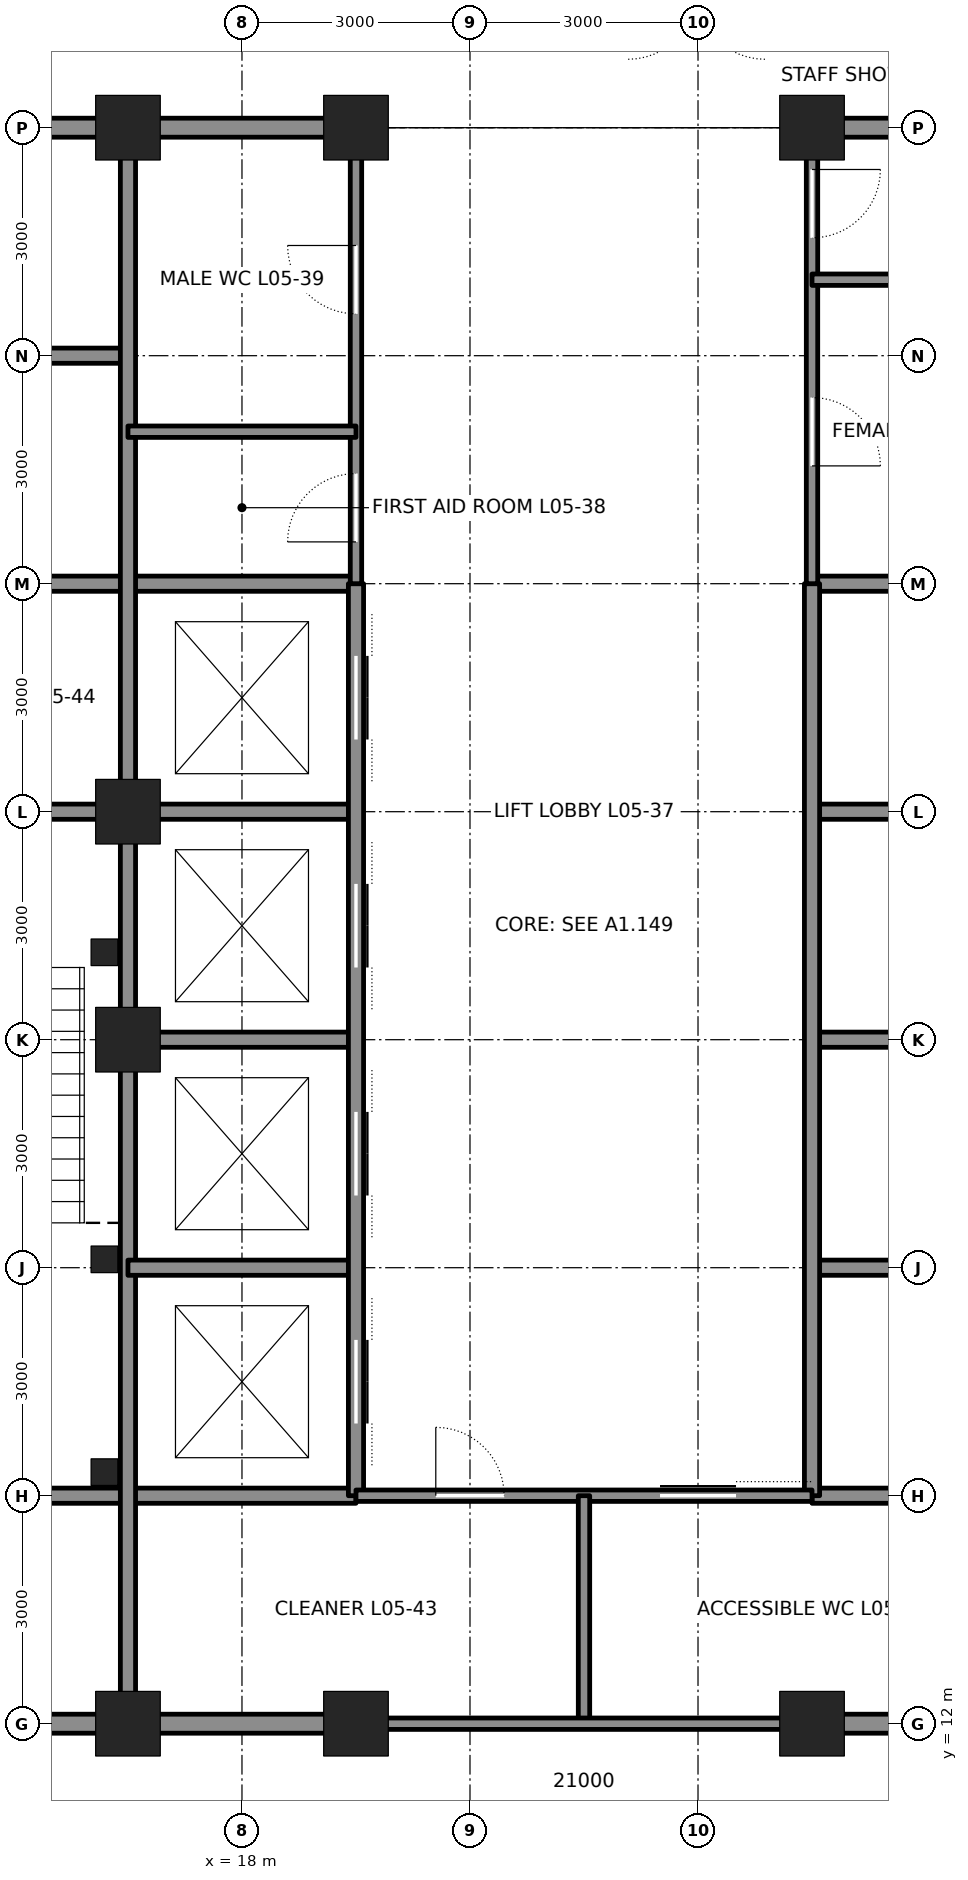
"""IFC4 building model, lengths in metres.
Left out: names, types, materials, properties, quantities, classifications, styles, units other than length and angle.
Written with IfcOpenShell. Run it as: python <this file> out.ifc"""

import sys

from ifc_helpers import new_model, si_unit, direction, frame, frame_2d, origin, origin_2d, place, context, subcontext, project, spatial, rectangle, hollow_rectangle, extrude, element, fill, save


model = new_model("IFC4")
c1 = context("Model", 3, precision=1e-05, world=origin(), true_north=direction((0.0, 1.0)))
c2 = subcontext(c1, "Body", "Model", "MODEL_VIEW")
j1 = project(units=[si_unit("LENGTHUNIT", "METRE"), si_unit("PLANEANGLEUNIT", "RADIAN")], contexts=[c1])
p1 = place(None, origin())
s1 = spatial("IfcSite", under=j1, at=p1, CompositionType="ELEMENT")
p2 = place(p1, origin())
s2 = spatial("IfcBuilding", under=s1, at=p2, CompositionType="ELEMENT")
p3 = place(p2, frame((0.0, 0.0, 28.8)))
s3 = spatial("IfcBuildingStorey", under=s2, at=p3, CompositionType="ELEMENT", Elevation=28.8)
for number, where, z_axis, x_axis in (
    (1, (16.5, 12.0, 0.0), (0.0, 0.0, 1.0), (1.0, 0.0, 0.0)),
    (2, (19.5, 12.0, 0.0), (0.0, 0.0, 1.0), (1.0, 0.0, 0.0)),
    (3, (25.5, 12.0, 0.0), (0.0, 0.0, 1.0), (1.0, 0.0, 0.0)),
    (4, (16.5, 33.0, 0.0), (0.0, 0.0, 1.0), (1.0, 0.0, 0.0)),
    (5, (19.5, 33.0, 0.0), (0.0, 0.0, 1.0), (1.0, 0.0, 0.0)),
    (6, (25.5, 33.0, 0.0), (0.0, 0.0, 1.0), (1.0, 0.0, 0.0)),
    (7, (16.5, 21.0, 0.0), (0.0, 0.0, 1.0), (1.0, 0.0, 0.0)),
    (8, (16.5, 24.0, 0.0), (0.0, 0.0, 1.0), (1.0, 0.0, 0.0)),
):
    element("IfcColumn", number, at=place(p3, frame(where, z_axis=z_axis, x_axis=x_axis)), inside=s3, PredefinedType="COLUMN", context=c2, shape_type="SweptSolid", body=[
        extrude(hollow_rectangle(XDim=0.85, YDim=0.85, WallThickness=0.085, at=origin_2d()), origin(), (0.0, 0.0, 1.0), 4.5),
    ])
p4 = place(p3, frame((12.25, 12.0, 0.0), z_axis=(0.0, 0.0, 1.0), x_axis=(1.0, 0.0, 0.0)))
e9 = element("IfcWall", 9, at=p4, inside=s3, PredefinedType="SOLIDWALL", context=c2, shape_type="SweptSolid", body=[
    extrude(rectangle(XDim=4.0, YDim=0.25, at=frame_2d((2.0, 0.0))), origin(), (0.0, 0.0, 1.0), 3.181),
])
for number, where, z_axis, x_axis in (
    (10, (16.75, 12.0, 0.0), (0.0, 0.0, 1.0), (1.0, 0.0, 0.0)),
    (11, (25.75, 12.0, 0.0), (0.0, 0.0, 1.0), (1.0, 0.0, 0.0)),
):
    element("IfcWall", number, at=place(p3, frame(where, z_axis=z_axis, x_axis=x_axis)), inside=s3, PredefinedType="SOLIDWALL", context=c2, shape_type="SweptSolid", body=[
        extrude(rectangle(XDim=2.5, YDim=0.25, at=frame_2d((1.25, 0.0))), origin(), (0.0, 0.0, 1.0), 3.181),
    ])
for number, where, z_axis, x_axis in (
    (12, (12.0, 15.0, 0.0), (0.0, 0.0, 1.0), (1.0, 0.0, 0.0)),
    (13, (25.5, 15.0, 0.0), (0.0, 0.0, 1.0), (1.0, 0.0, 0.0)),
):
    element("IfcWall", number, at=place(p3, frame(where, z_axis=z_axis, x_axis=x_axis)), inside=s3, PredefinedType="SOLIDWALL", context=c2, shape_type="SweptSolid", body=[
        extrude(rectangle(XDim=7.5, YDim=0.2, at=frame_2d((3.75, 0.0))), origin(), (0.0, 0.0, 1.0), 4.34),
    ])
p5 = place(p3, frame((12.25, 24.0, 0.0), z_axis=(0.0, 0.0, 1.0), x_axis=(1.0, 0.0, 0.0)))
e14 = element("IfcWall", 14, at=p5, inside=s3, PredefinedType="SOLIDWALL", context=c2, shape_type="SweptSolid", body=[
    extrude(rectangle(XDim=4.0, YDim=0.2, at=frame_2d((2.0, 0.0))), origin(), (0.0, 0.0, 1.0), 3.39),
])
p6 = place(p5, frame((1.4, 0.0, 0.0)))
e15 = element("IfcOpeningElement", 15, at=p6, cuts=e14, PredefinedType="OPENING", context=c2, shape_type="SweptSolid", body=[
    extrude(rectangle(XDim=1.2, YDim=2.1, at=frame_2d((0.6, 1.05))), frame((0.0, 0.11, 0.0), z_axis=(0.0, -1.0, 0.0), x_axis=(1.0, 0.0, 0.0)), (0.0, 0.0, 1.0), 0.22),
])
for number, where, z_axis, x_axis in (
    (16, (16.75, 24.0, 0.0), (0.0, 0.0, 1.0), (1.0, 0.0, 0.0)),
    (17, (25.5, 24.0, 0.0), (0.0, 0.0, 1.0), (1.0, 0.0, 0.0)),
):
    element("IfcWall", number, at=place(p3, frame(where, z_axis=z_axis, x_axis=x_axis)), inside=s3, PredefinedType="SOLIDWALL", context=c2, shape_type="SweptSolid", body=[
        extrude(rectangle(XDim=2.75, YDim=0.2, at=frame_2d((1.375, 0.0))), origin(), (0.0, 0.0, 1.0), 3.39),
    ])
p7 = place(p3, frame((12.0, 27.0, 0.0), z_axis=(0.0, 0.0, 1.0), x_axis=(1.0, 0.0, 0.0)))
e18 = element("IfcWall", 18, at=p7, inside=s3, PredefinedType="SOLIDWALL", context=c2, shape_type="SweptSolid", body=[
    extrude(rectangle(XDim=7.5, YDim=0.2, at=frame_2d((3.75, 0.0))), origin(), (0.0, 0.0, 1.0), 4.34),
])
p8 = place(p7, frame((1.65, 0.0, 0.0)))
e19 = element("IfcOpeningElement", 19, at=p8, cuts=e18, PredefinedType="OPENING", context=c2, shape_type="SweptSolid", body=[
    extrude(rectangle(XDim=1.2, YDim=2.1, at=frame_2d((0.6, 1.05))), frame((0.0, 0.11, 0.0), z_axis=(0.0, -1.0, 0.0), x_axis=(1.0, 0.0, 0.0)), (0.0, 0.0, 1.0), 0.22),
])
p9 = place(p3, frame((25.5, 27.0, 0.0), z_axis=(0.0, 0.0, 1.0), x_axis=(1.0, 0.0, 0.0)))
e20 = element("IfcWall", 20, at=p9, inside=s3, PredefinedType="SOLIDWALL", context=c2, shape_type="SweptSolid", body=[
    extrude(rectangle(XDim=3.0, YDim=0.2, at=frame_2d((1.5, 0.0))), origin(), (0.0, 0.0, 1.0), 4.34),
])
p10 = place(p3, frame((12.0, 30.0, 0.0), z_axis=(0.0, 0.0, 1.0), x_axis=(1.0, 0.0, 0.0)))
e21 = element("IfcWall", 21, at=p10, inside=s3, PredefinedType="SOLIDWALL", context=c2, shape_type="SweptSolid", body=[
    extrude(rectangle(XDim=4.5, YDim=0.2, at=frame_2d((2.25, 0.0))), origin(), (0.0, 0.0, 1.0), 4.34),
])
p11 = place(p3, frame((12.25, 33.0, 0.0), z_axis=(0.0, 0.0, 1.0), x_axis=(1.0, 0.0, 0.0)))
e22 = element("IfcWall", 22, at=p11, inside=s3, PredefinedType="SOLIDWALL", context=c2, shape_type="SweptSolid", body=[
    extrude(rectangle(XDim=4.0, YDim=0.25, at=frame_2d((2.0, 0.0))), origin(), (0.0, 0.0, 1.0), 3.181),
])
for number, where, z_axis, x_axis in (
    (23, (16.75, 33.0, 0.0), (0.0, 0.0, 1.0), (1.0, 0.0, 0.0)),
    (24, (25.75, 33.0, 0.0), (0.0, 0.0, 1.0), (1.0, 0.0, 0.0)),
):
    element("IfcWall", number, at=place(p3, frame(where, z_axis=z_axis, x_axis=x_axis)), inside=s3, PredefinedType="SOLIDWALL", context=c2, shape_type="SweptSolid", body=[
        extrude(rectangle(XDim=2.5, YDim=0.25, at=frame_2d((1.25, 0.0))), origin(), (0.0, 0.0, 1.0), 3.181),
    ])
p12 = place(p3, frame((16.5, 12.25, 0.0), z_axis=(0.0, 0.0, 1.0), x_axis=(0.0, 1.0, 0.0)))
e25 = element("IfcWall", 25, at=p12, inside=s3, PredefinedType="SOLIDWALL", context=c2, shape_type="SweptSolid", body=[
    extrude(rectangle(XDim=8.5, YDim=0.2, at=frame_2d((4.25, 0.0))), origin(), (0.0, 0.0, 1.0), 3.413),
])
p13 = place(p3, frame((16.5, 21.25, 0.0), z_axis=(0.0, 0.0, 1.0), x_axis=(0.0, 1.0, 0.0)))
e26 = element("IfcWall", 26, at=p13, inside=s3, PredefinedType="SOLIDWALL", context=c2, shape_type="SweptSolid", body=[
    extrude(rectangle(XDim=2.5, YDim=0.2, at=frame_2d((1.25, 0.0))), origin(), (0.0, 0.0, 1.0), 3.413),
])
p14 = place(p3, frame((16.5, 24.25, 0.0), z_axis=(0.0, 0.0, 1.0), x_axis=(0.0, 1.0, 0.0)))
e27 = element("IfcWall", 27, at=p14, inside=s3, PredefinedType="SOLIDWALL", context=c2, shape_type="SweptSolid", body=[
    extrude(rectangle(XDim=8.5, YDim=0.2, at=frame_2d((4.25, 0.0))), origin(), (0.0, 0.0, 1.0), 3.413),
])
p15 = place(p3, frame((16.5, 18.0, 0.0), z_axis=(0.0, 0.0, 1.0), x_axis=(1.0, 0.0, 0.0)))
e28 = element("IfcWall", 28, at=p15, inside=s3, PredefinedType="SOLIDWALL", context=c2, shape_type="SweptSolid", body=[
    extrude(rectangle(XDim=3.0, YDim=0.2, at=frame_2d((1.5, 0.0))), origin(), (0.0, 0.0, 1.0), 4.34),
])
p16 = place(p3, frame((25.5, 18.0, 0.0), z_axis=(0.0, 0.0, 1.0), x_axis=(1.0, 0.0, 0.0)))
e29 = element("IfcWall", 29, at=p16, inside=s3, PredefinedType="SOLIDWALL", context=c2, shape_type="SweptSolid", body=[
    extrude(rectangle(XDim=7.5, YDim=0.2, at=frame_2d((3.75, 0.0))), origin(), (0.0, 0.0, 1.0), 4.34),
])
p17 = place(p16, frame((4.65, 0.0, 0.0)))
e30 = element("IfcOpeningElement", 30, at=p17, cuts=e29, PredefinedType="OPENING", context=c2, shape_type="SweptSolid", body=[
    extrude(rectangle(XDim=1.2, YDim=2.1, at=frame_2d((0.6, 1.05))), frame((0.0, 0.11, 0.0), z_axis=(0.0, -1.0, 0.0), x_axis=(1.0, 0.0, 0.0)), (0.0, 0.0, 1.0), 0.22),
])
for number, where, z_axis, x_axis in (
    (31, (16.75, 21.0, 0.0), (0.0, 0.0, 1.0), (1.0, 0.0, 0.0)),
    (32, (25.5, 21.0, 0.0), (0.0, 0.0, 1.0), (1.0, 0.0, 0.0)),
):
    element("IfcWall", number, at=place(p3, frame(where, z_axis=z_axis, x_axis=x_axis)), inside=s3, PredefinedType="SOLIDWALL", context=c2, shape_type="SweptSolid", body=[
        extrude(rectangle(XDim=2.75, YDim=0.2, at=frame_2d((1.375, 0.0))), origin(), (0.0, 0.0, 1.0), 3.39),
    ])
p18 = place(p3, frame((19.5, 15.0, 0.0), z_axis=(0.0, 0.0, 1.0), x_axis=(0.0, 1.0, 0.0)))
e33 = element("IfcWall", 33, at=p18, inside=s3, PredefinedType="SOLIDWALL", context=c2, shape_type="SweptSolid", body=[
    extrude(rectangle(XDim=12.0, YDim=0.2, at=frame_2d((6.0, 0.0))), origin(), (0.0, 0.0, 1.0), 3.365),
])
p19 = place(p18, frame((0.95, 0.0, 0.0)))
e34 = element("IfcOpeningElement", 34, at=p19, cuts=e33, PredefinedType="OPENING", context=c2, shape_type="SweptSolid", body=[
    extrude(rectangle(XDim=1.1, YDim=2.1, at=frame_2d((0.55, 1.05))), frame((0.0, 0.11, 0.0), z_axis=(0.0, -1.0, 0.0), x_axis=(1.0, 0.0, 0.0)), (0.0, 0.0, 1.0), 0.22),
])
p20 = place(p18, frame((3.95, 0.0, 0.0)))
e35 = element("IfcOpeningElement", 35, at=p20, cuts=e33, PredefinedType="OPENING", context=c2, shape_type="SweptSolid", body=[
    extrude(rectangle(XDim=1.1, YDim=2.1, at=frame_2d((0.55, 1.05))), frame((0.0, 0.11, 0.0), z_axis=(0.0, -1.0, 0.0), x_axis=(1.0, 0.0, 0.0)), (0.0, 0.0, 1.0), 0.22),
])
p21 = place(p18, frame((6.95, 0.0, 0.0)))
e36 = element("IfcOpeningElement", 36, at=p21, cuts=e33, PredefinedType="OPENING", context=c2, shape_type="SweptSolid", body=[
    extrude(rectangle(XDim=1.1, YDim=2.1, at=frame_2d((0.55, 1.05))), frame((0.0, 0.11, 0.0), z_axis=(0.0, -1.0, 0.0), x_axis=(1.0, 0.0, 0.0)), (0.0, 0.0, 1.0), 0.22),
])
p22 = place(p18, frame((9.95, 0.0, 0.0)))
e37 = element("IfcOpeningElement", 37, at=p22, cuts=e33, PredefinedType="OPENING", context=c2, shape_type="SweptSolid", body=[
    extrude(rectangle(XDim=1.1, YDim=2.1, at=frame_2d((0.55, 1.05))), frame((0.0, 0.11, 0.0), z_axis=(0.0, -1.0, 0.0), x_axis=(1.0, 0.0, 0.0)), (0.0, 0.0, 1.0), 0.22),
])
p23 = place(p3, frame((19.5, 27.0, 0.0), z_axis=(0.0, 0.0, 1.0), x_axis=(0.0, 1.0, 0.0)))
e38 = element("IfcWall", 38, at=p23, inside=s3, PredefinedType="PARTITIONING", context=c2, shape_type="SweptSolid", body=[
    extrude(rectangle(XDim=5.75, YDim=0.15, at=frame_2d((2.875, 0.0))), origin(), (0.0, 0.0, 1.0), 3.365),
])
p24 = place(p23, frame((0.55, 0.0, 0.0)))
e39 = element("IfcOpeningElement", 39, at=p24, cuts=e38, PredefinedType="OPENING", context=c2, shape_type="SweptSolid", body=[
    extrude(rectangle(XDim=0.9, YDim=2.1, at=frame_2d((0.45, 1.05))), frame((0.0, 0.085, 0.0), z_axis=(0.0, -1.0, 0.0), x_axis=(1.0, 0.0, 0.0)), (0.0, 0.0, 1.0), 0.17),
])
p25 = place(p23, frame((3.55, 0.0, 0.0)))
e40 = element("IfcOpeningElement", 40, at=p25, cuts=e38, PredefinedType="OPENING", context=c2, shape_type="SweptSolid", body=[
    extrude(rectangle(XDim=0.9, YDim=2.1, at=frame_2d((0.45, 1.05))), frame((0.0, 0.085, 0.0), z_axis=(0.0, -1.0, 0.0), x_axis=(1.0, 0.0, 0.0)), (0.0, 0.0, 1.0), 0.17),
])
p26 = place(p3, frame((25.5, 15.0, 0.0), z_axis=(0.0, 0.0, 1.0), x_axis=(0.0, 1.0, 0.0)))
e41 = element("IfcWall", 41, at=p26, inside=s3, PredefinedType="SOLIDWALL", context=c2, shape_type="SweptSolid", body=[
    extrude(rectangle(XDim=12.0, YDim=0.2, at=frame_2d((6.0, 0.0))), origin(), (0.0, 0.0, 1.0), 3.365),
])
p27 = place(p3, frame((25.5, 27.0, 0.0), z_axis=(0.0, 0.0, 1.0), x_axis=(0.0, 1.0, 0.0)))
e42 = element("IfcWall", 42, at=p27, inside=s3, PredefinedType="PARTITIONING", context=c2, shape_type="SweptSolid", body=[
    extrude(rectangle(XDim=5.75, YDim=0.15, at=frame_2d((2.875, 0.0))), origin(), (0.0, 0.0, 1.0), 3.365),
])
p28 = place(p27, frame((1.55, 0.0, 0.0)))
e43 = element("IfcOpeningElement", 43, at=p28, cuts=e42, PredefinedType="OPENING", context=c2, shape_type="SweptSolid", body=[
    extrude(rectangle(XDim=0.9, YDim=2.1, at=frame_2d((0.45, 1.05))), frame((0.0, 0.085, 0.0), z_axis=(0.0, -1.0, 0.0), x_axis=(1.0, 0.0, 0.0)), (0.0, 0.0, 1.0), 0.17),
])
p29 = place(p27, frame((4.55, 0.0, 0.0)))
e44 = element("IfcOpeningElement", 44, at=p29, cuts=e42, PredefinedType="OPENING", context=c2, shape_type="SweptSolid", body=[
    extrude(rectangle(XDim=0.9, YDim=2.1, at=frame_2d((0.45, 1.05))), frame((0.0, 0.085, 0.0), z_axis=(0.0, -1.0, 0.0), x_axis=(1.0, 0.0, 0.0)), (0.0, 0.0, 1.0), 0.17),
])
p30 = place(p3, frame((19.5, 15.0, 0.0), z_axis=(0.0, 0.0, 1.0), x_axis=(1.0, 0.0, 0.0)))
e45 = element("IfcWall", 45, at=p30, inside=s3, PredefinedType="PARTITIONING", context=c2, shape_type="SweptSolid", body=[
    extrude(rectangle(XDim=6.0, YDim=0.15, at=frame_2d((3.0, 0.0))), origin(), (0.0, 0.0, 1.0), 4.34),
])
p31 = place(p30, frame((4.0, 0.0, 0.0)))
e46 = element("IfcOpeningElement", 46, at=p31, cuts=e45, PredefinedType="OPENING", context=c2, shape_type="SweptSolid", body=[
    extrude(rectangle(XDim=1.0, YDim=2.1, at=frame_2d((0.5, 1.05))), frame((0.0, 0.085, 0.0), z_axis=(0.0, -1.0, 0.0), x_axis=(1.0, 0.0, 0.0)), (0.0, 0.0, 1.0), 0.17),
])
p32 = place(p30, frame((1.05, 0.0, 0.0)))
e47 = element("IfcOpeningElement", 47, at=p32, cuts=e45, PredefinedType="OPENING", context=c2, shape_type="SweptSolid", body=[
    extrude(rectangle(XDim=0.9, YDim=2.1, at=frame_2d((0.45, 1.05))), frame((0.0, 0.085, 0.0), z_axis=(0.0, -1.0, 0.0), x_axis=(1.0, 0.0, 0.0)), (0.0, 0.0, 1.0), 0.17),
])
p33 = place(p3, frame((22.5, 15.0, 0.0), z_axis=(0.0, 0.0, 1.0), x_axis=(0.0, -1.0, 0.0)))
e48 = element("IfcWall", 48, at=p33, inside=s3, PredefinedType="PARTITIONING", context=c2, shape_type="SweptSolid", body=[
    extrude(rectangle(XDim=3.0, YDim=0.15, at=frame_2d((1.5, 0.0))), origin(), (0.0, 0.0, 1.0), 4.34),
])
p34 = place(p3, frame((19.5, 12.0, 0.0), z_axis=(0.0, 0.0, 1.0), x_axis=(1.0, 0.0, 0.0)))
e49 = element("IfcWall", 49, at=p34, inside=s3, PredefinedType="PARTITIONING", context=c2, shape_type="SweptSolid", body=[
    extrude(rectangle(XDim=6.0, YDim=0.15, at=frame_2d((3.0, 0.0))), origin(), (0.0, 0.0, 1.0), 3.181),
])
for number, where, z_axis, x_axis in (
    (50, (16.5, 29.0, 0.0), (0.0, 0.0, 1.0), (1.0, 0.0, 0.0)),
    (51, (25.5, 31.0, 0.0), (0.0, 0.0, 1.0), (1.0, 0.0, 0.0)),
):
    element("IfcWall", number, at=place(p3, frame(where, z_axis=z_axis, x_axis=x_axis)), inside=s3, PredefinedType="PARTITIONING", context=c2, shape_type="SweptSolid", body=[
        extrude(rectangle(XDim=3.0, YDim=0.15, at=frame_2d((1.5, 0.0))), origin(), (0.0, 0.0, 1.0), 4.34),
    ])
for number, where, z_axis, x_axis in (
    (52, (16.19, 15.31, 0.0), (0.0, 0.0, 1.0), (1.0, 0.0, 0.0)),
    (53, (16.19, 18.11, 0.0), (0.0, 0.0, 1.0), (1.0, 0.0, 0.0)),
    (54, (16.19, 22.15, 0.0), (0.0, 0.0, 1.0), (1.0, 0.0, 0.0)),
):
    element("IfcColumn", number, at=place(p3, frame(where, z_axis=z_axis, x_axis=x_axis)), inside=s3, PredefinedType="COLUMN", context=c2, shape_type="SweptSolid", body=[
        extrude(hollow_rectangle(XDim=0.35, YDim=0.35, WallThickness=0.035, at=origin_2d()), origin(), (0.0, 0.0, 1.0), 4.5),
    ])
p35 = place(p24, origin())
e55 = element("IfcDoor", 55, at=p35, inside=s3, OperationType="SINGLE_SWING_LEFT", PredefinedType="DOOR", context=c2, shape_type="SweptSolid", body=[
    extrude(rectangle(XDim=0.9, YDim=2.1, at=frame_2d((0.45, 1.05))), frame((0.0, 0.025, 0.0), z_axis=(0.0, -1.0, 0.0), x_axis=(1.0, 0.0, 0.0)), (0.0, 0.0, 1.0), 0.05),
])
fill(e39, e55)
p36 = place(p25, origin())
e56 = element("IfcDoor", 56, at=p36, inside=s3, OperationType="SINGLE_SWING_RIGHT", PredefinedType="DOOR", context=c2, shape_type="SweptSolid", body=[
    extrude(rectangle(XDim=0.9, YDim=2.1, at=frame_2d((0.45, 1.05))), frame((0.0, 0.025, 0.0), z_axis=(0.0, -1.0, 0.0), x_axis=(1.0, 0.0, 0.0)), (0.0, 0.0, 1.0), 0.05),
])
fill(e40, e56)
p37 = place(p28, frame((0.9, 0.0, 0.0), z_axis=(0.0, 0.0, 1.0), x_axis=(-1.0, 0.0, 0.0)))
e57 = element("IfcDoor", 57, at=p37, inside=s3, OperationType="SINGLE_SWING_RIGHT", PredefinedType="DOOR", context=c2, shape_type="SweptSolid", body=[
    extrude(rectangle(XDim=0.9, YDim=2.1, at=frame_2d((0.45, 1.05))), frame((0.0, 0.025, 0.0), z_axis=(0.0, -1.0, 0.0), x_axis=(1.0, 0.0, 0.0)), (0.0, 0.0, 1.0), 0.05),
])
fill(e43, e57)
p38 = place(p29, frame((0.9, 0.0, 0.0), z_axis=(0.0, 0.0, 1.0), x_axis=(-1.0, 0.0, 0.0)))
e58 = element("IfcDoor", 58, at=p38, inside=s3, OperationType="SINGLE_SWING_LEFT", PredefinedType="DOOR", context=c2, shape_type="SweptSolid", body=[
    extrude(rectangle(XDim=0.9, YDim=2.1, at=frame_2d((0.45, 1.05))), frame((0.0, 0.025, 0.0), z_axis=(0.0, -1.0, 0.0), x_axis=(1.0, 0.0, 0.0)), (0.0, 0.0, 1.0), 0.05),
])
fill(e44, e58)
p39 = place(p31, origin())
e59 = element("IfcDoor", 59, at=p39, inside=s3, OperationType="SLIDING_TO_LEFT", PredefinedType="DOOR", context=c2, shape_type="SweptSolid", body=[
    extrude(rectangle(XDim=1.0, YDim=2.1, at=frame_2d((0.5, 1.05))), frame((0.0, 0.025, 0.0), z_axis=(0.0, -1.0, 0.0), x_axis=(1.0, 0.0, 0.0)), (0.0, 0.0, 1.0), 0.05),
])
fill(e46, e59)
p40 = place(p32, origin())
e60 = element("IfcDoor", 60, at=p40, inside=s3, OperationType="SINGLE_SWING_LEFT", PredefinedType="DOOR", context=c2, shape_type="SweptSolid", body=[
    extrude(rectangle(XDim=0.9, YDim=2.1, at=frame_2d((0.45, 1.05))), frame((0.0, 0.025, 0.0), z_axis=(0.0, -1.0, 0.0), x_axis=(1.0, 0.0, 0.0)), (0.0, 0.0, 1.0), 0.05),
])
fill(e47, e60)
p41 = place(p19, origin())
e61 = element("IfcDoor", 61, at=p41, inside=s3, OperationType="DOUBLE_DOOR_SLIDING", PredefinedType="DOOR", context=c2, shape_type="SweptSolid", body=[
    extrude(rectangle(XDim=1.1, YDim=2.1, at=frame_2d((0.55, 1.05))), frame((0.0, 0.025, 0.0), z_axis=(0.0, -1.0, 0.0), x_axis=(1.0, 0.0, 0.0)), (0.0, 0.0, 1.0), 0.05),
])
fill(e34, e61)
p42 = place(p20, origin())
e62 = element("IfcDoor", 62, at=p42, inside=s3, OperationType="DOUBLE_DOOR_SLIDING", PredefinedType="DOOR", context=c2, shape_type="SweptSolid", body=[
    extrude(rectangle(XDim=1.1, YDim=2.1, at=frame_2d((0.55, 1.05))), frame((0.0, 0.025, 0.0), z_axis=(0.0, -1.0, 0.0), x_axis=(1.0, 0.0, 0.0)), (0.0, 0.0, 1.0), 0.05),
])
fill(e35, e62)
p43 = place(p21, origin())
e63 = element("IfcDoor", 63, at=p43, inside=s3, OperationType="DOUBLE_DOOR_SLIDING", PredefinedType="DOOR", context=c2, shape_type="SweptSolid", body=[
    extrude(rectangle(XDim=1.1, YDim=2.1, at=frame_2d((0.55, 1.05))), frame((0.0, 0.025, 0.0), z_axis=(0.0, -1.0, 0.0), x_axis=(1.0, 0.0, 0.0)), (0.0, 0.0, 1.0), 0.05),
])
fill(e36, e63)
p44 = place(p22, origin())
e64 = element("IfcDoor", 64, at=p44, inside=s3, OperationType="DOUBLE_DOOR_SLIDING", PredefinedType="DOOR", context=c2, shape_type="SweptSolid", body=[
    extrude(rectangle(XDim=1.1, YDim=2.1, at=frame_2d((0.55, 1.05))), frame((0.0, 0.025, 0.0), z_axis=(0.0, -1.0, 0.0), x_axis=(1.0, 0.0, 0.0)), (0.0, 0.0, 1.0), 0.05),
])
fill(e37, e64)
save(model, sys.argv[1])
